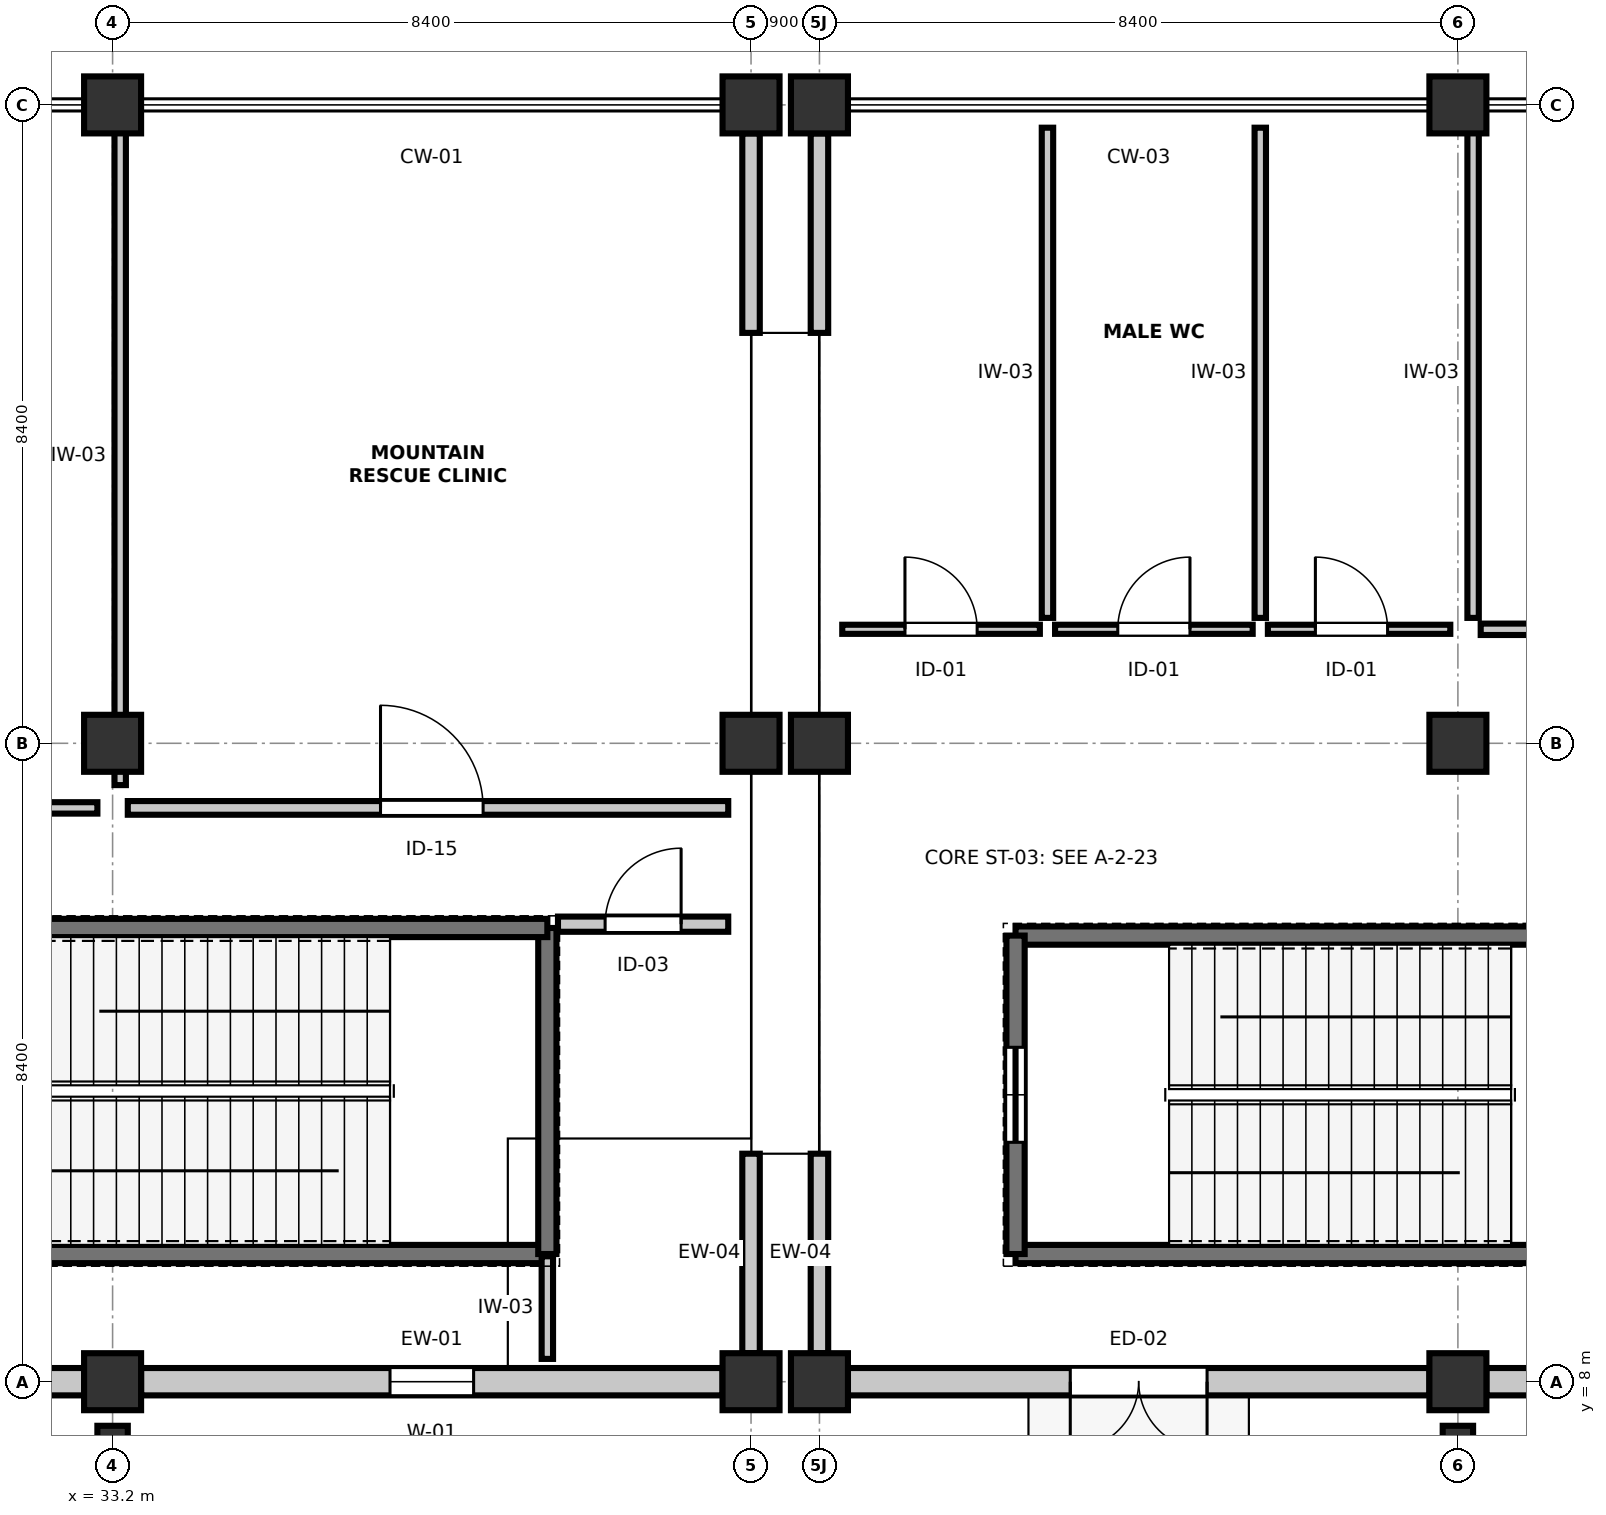
"""IFC4 building model, lengths in metres.
Left out: names, types, materials, properties, quantities, classifications, styles, units other than length and angle.
Written with IfcOpenShell. Run it as: python <this file> out.ifc"""

import sys

from ifc_helpers import new_model, si_unit, direction, frame, frame_2d, origin, origin_2d, place, context, subcontext, project, spatial, rectangle, extrude, element, fill, save


model = new_model("IFC4")
c1 = context("Model", 3, precision=1e-05, world=origin(), true_north=direction((0.0, 1.0)))
c2 = subcontext(c1, "Body", "Model", "MODEL_VIEW")
j1 = project(units=[si_unit("LENGTHUNIT", "METRE"), si_unit("PLANEANGLEUNIT", "RADIAN")], contexts=[c1])
p1 = place(None, origin())
s1 = spatial("IfcSite", under=j1, at=p1, CompositionType="ELEMENT")
p2 = place(p1, origin())
s2 = spatial("IfcBuilding", under=s1, at=p2, CompositionType="ELEMENT")
p3 = place(p2, origin())
s3 = spatial("IfcBuildingStorey", under=s2, at=p3, CompositionType="ELEMENT", Elevation=0.0)
p4 = place(p3, frame((33.2, 8.0, 0.0), z_axis=(0.0, 0.0, 1.0), x_axis=(1.0, 0.0, 0.0)))
e1 = element("IfcColumn", 1, at=p4, inside=s3, PredefinedType="COLUMN", context=c2, shape_type="SweptSolid", body=[
    extrude(rectangle(XDim=0.75, YDim=0.75, at=origin_2d()), origin(), (0.0, 0.0, 1.0), 4.8),
])
p5 = place(p3, frame((33.2, 7.095, 0.0), z_axis=(0.0, 0.0, 1.0), x_axis=(1.0, 0.0, 0.0)))
e2 = element("IfcColumn", 2, at=p5, inside=s3, PredefinedType="PILASTER", context=c2, shape_type="SweptSolid", body=[
    extrude(rectangle(XDim=0.4, YDim=0.65, at=origin_2d()), origin(), (0.0, 0.0, 1.0), 4.8),
])
for number, where, z_axis, x_axis in (
    (3, (33.2, 16.4, 0.0), (0.0, 0.0, 1.0), (1.0, 0.0, 0.0)),
    (4, (33.2, 24.8, 0.0), (0.0, 0.0, 1.0), (1.0, 0.0, 0.0)),
    (5, (41.6, 8.0, 0.0), (0.0, 0.0, 1.0), (1.0, 0.0, 0.0)),
    (6, (41.6, 16.4, 0.0), (0.0, 0.0, 1.0), (1.0, 0.0, 0.0)),
    (7, (41.6, 24.8, 0.0), (0.0, 0.0, 1.0), (1.0, 0.0, 0.0)),
    (8, (42.5, 8.0, 0.0), (0.0, 0.0, 1.0), (1.0, 0.0, 0.0)),
    (9, (42.5, 16.4, 0.0), (0.0, 0.0, 1.0), (1.0, 0.0, 0.0)),
    (10, (42.5, 24.8, 0.0), (0.0, 0.0, 1.0), (1.0, 0.0, 0.0)),
    (11, (50.9, 8.0, 0.0), (0.0, 0.0, 1.0), (1.0, 0.0, 0.0)),
):
    element("IfcColumn", number, at=place(p3, frame(where, z_axis=z_axis, x_axis=x_axis)), inside=s3, PredefinedType="COLUMN", context=c2, shape_type="SweptSolid", body=[
        extrude(rectangle(XDim=0.75, YDim=0.75, at=origin_2d()), origin(), (0.0, 0.0, 1.0), 4.8),
    ])
p6 = place(p3, frame((50.9, 7.095, 0.0), z_axis=(0.0, 0.0, 1.0), x_axis=(1.0, 0.0, 0.0)))
e12 = element("IfcColumn", 12, at=p6, inside=s3, PredefinedType="PILASTER", context=c2, shape_type="SweptSolid", body=[
    extrude(rectangle(XDim=0.4, YDim=0.65, at=origin_2d()), origin(), (0.0, 0.0, 1.0), 4.8),
])
for number, where, z_axis, x_axis in (
    (13, (50.9, 16.4, 0.0), (0.0, 0.0, 1.0), (1.0, 0.0, 0.0)),
    (14, (50.9, 24.8, 0.0), (0.0, 0.0, 1.0), (1.0, 0.0, 0.0)),
):
    element("IfcColumn", number, at=place(p3, frame(where, z_axis=z_axis, x_axis=x_axis)), inside=s3, PredefinedType="COLUMN", context=c2, shape_type="SweptSolid", body=[
        extrude(rectangle(XDim=0.75, YDim=0.75, at=origin_2d()), origin(), (0.0, 0.0, 1.0), 4.8),
    ])
p7 = place(p3, frame((32.825, 8.0, 0.0), z_axis=(0.0, 0.0, 1.0), x_axis=(-1.0, 0.0, 0.0)))
e15 = element("IfcWall", 15, at=p7, inside=s3, PredefinedType="STANDARD", context=c2, shape_type="SweptSolid", body=[
    extrude(rectangle(XDim=7.65, YDim=0.36, at=frame_2d((3.825, 0.0))), origin(), (0.0, 0.0, 1.0), 3.785),
])
p8 = place(p7, frame((2.925, 0.0, 0.0)))
e16 = element("IfcOpeningElement", 16, at=p8, cuts=e15, PredefinedType="OPENING", context=c2, shape_type="SweptSolid", body=[
    extrude(rectangle(XDim=1.8, YDim=2.25, at=frame_2d((0.9, 1.125))), frame((0.0, 0.19, 0.0), z_axis=(0.0, -1.0, 0.0), x_axis=(1.0, 0.0, 0.0)), (0.0, 0.0, 1.0), 0.38),
])
p9 = place(p3, frame((33.575, 8.0, 0.0), z_axis=(0.0, 0.0, 1.0), x_axis=(1.0, 0.0, 0.0)))
e17 = element("IfcWall", 17, at=p9, inside=s3, PredefinedType="STANDARD", context=c2, shape_type="SweptSolid", body=[
    extrude(rectangle(XDim=7.65, YDim=0.36, at=frame_2d((3.825, 0.0))), origin(), (0.0, 0.0, 1.0), 3.785),
])
p10 = place(p9, frame((3.275, 0.0, 0.95)))
e18 = element("IfcOpeningElement", 18, at=p10, cuts=e17, PredefinedType="OPENING", context=c2, shape_type="SweptSolid", body=[
    extrude(rectangle(XDim=1.1, YDim=1.45, at=frame_2d((0.55, 0.725))), frame((0.0, 0.19, 0.0), z_axis=(0.0, -1.0, 0.0), x_axis=(1.0, 0.0, 0.0)), (0.0, 0.0, 1.0), 0.38),
])
p11 = place(p3, frame((41.6, 8.375, 0.0), z_axis=(0.0, 0.0, 1.0), x_axis=(0.0, 1.0, 0.0)))
e19 = element("IfcWall", 19, at=p11, inside=s3, PredefinedType="STANDARD", context=c2, shape_type="SweptSolid", body=[
    extrude(rectangle(XDim=2.625, YDim=0.23, at=frame_2d((1.312, 0.0))), origin(), (0.0, 0.0, 1.0), 3.785),
])
p12 = place(p3, frame((41.6, 21.8, 0.0), z_axis=(0.0, 0.0, 1.0), x_axis=(0.0, 1.0, 0.0)))
e20 = element("IfcWall", 20, at=p12, inside=s3, PredefinedType="STANDARD", context=c2, shape_type="SweptSolid", body=[
    extrude(rectangle(XDim=2.625, YDim=0.23, at=frame_2d((1.312, 0.0))), origin(), (0.0, 0.0, 1.0), 3.715),
])
p13 = place(p3, frame((50.525, 8.0, 0.0), z_axis=(0.0, 0.0, 1.0), x_axis=(-1.0, 0.0, 0.0)))
e21 = element("IfcWall", 21, at=p13, inside=s3, PredefinedType="STANDARD", context=c2, shape_type="SweptSolid", body=[
    extrude(rectangle(XDim=7.65, YDim=0.36, at=frame_2d((3.825, 0.0))), origin(), (0.0, 0.0, 1.0), 3.785),
])
p14 = place(p13, frame((2.925, 0.0, 0.0)))
e22 = element("IfcOpeningElement", 22, at=p14, cuts=e21, PredefinedType="OPENING", context=c2, shape_type="SweptSolid", body=[
    extrude(rectangle(XDim=1.8, YDim=2.25, at=frame_2d((0.9, 1.125))), frame((0.0, 0.19, 0.0), z_axis=(0.0, -1.0, 0.0), x_axis=(1.0, 0.0, 0.0)), (0.0, 0.0, 1.0), 0.38),
])
p15 = place(p3, frame((58.925, 8.0, 0.0), z_axis=(0.0, 0.0, 1.0), x_axis=(-1.0, 0.0, 0.0)))
e23 = element("IfcWall", 23, at=p15, inside=s3, PredefinedType="STANDARD", context=c2, shape_type="SweptSolid", body=[
    extrude(rectangle(XDim=7.65, YDim=0.36, at=frame_2d((3.825, 0.0))), origin(), (0.0, 0.0, 1.0), 3.785),
])
p16 = place(p15, frame((2.925, 0.0, 0.0)))
e24 = element("IfcOpeningElement", 24, at=p16, cuts=e23, PredefinedType="OPENING", context=c2, shape_type="SweptSolid", body=[
    extrude(rectangle(XDim=1.8, YDim=2.25, at=frame_2d((0.9, 1.125))), frame((0.0, 0.19, 0.0), z_axis=(0.0, -1.0, 0.0), x_axis=(1.0, 0.0, 0.0)), (0.0, 0.0, 1.0), 0.38),
])
for number, where, z_axis, x_axis in (
    (25, (42.5, 8.375, 0.0), (0.0, 0.0, 1.0), (0.0, 1.0, 0.0)),
    (26, (42.5, 21.8, 0.0), (0.0, 0.0, 1.0), (0.0, 1.0, 0.0)),
):
    element("IfcWall", number, at=place(p3, frame(where, z_axis=z_axis, x_axis=x_axis)), inside=s3, PredefinedType="STANDARD", context=c2, shape_type="SweptSolid", body=[
        extrude(rectangle(XDim=2.625, YDim=0.23, at=frame_2d((1.312, 0.0))), origin(), (0.0, 0.0, 1.0), 3.785),
    ])
p17 = place(p3, frame((30.28, 9.68, 0.0), z_axis=(0.0, 0.0, 1.0), x_axis=(1.0, 0.0, 0.0)))
e27 = element("IfcWall", 27, at=p17, inside=s3, PredefinedType="SHEAR", context=c2, shape_type="SweptSolid", body=[
    extrude(rectangle(XDim=8.64, YDim=0.24, at=frame_2d((4.32, 0.0))), origin(), (0.0, 0.0, 1.0), 4.55),
])
p18 = place(p3, frame((38.92, 9.68, 0.0), z_axis=(0.0, 0.0, 1.0), x_axis=(0.0, 1.0, 0.0)))
e28 = element("IfcWall", 28, at=p18, inside=s3, PredefinedType="SHEAR", context=c2, shape_type="SweptSolid", body=[
    extrude(rectangle(XDim=4.29, YDim=0.24, at=frame_2d((2.145, 0.0))), origin(), (0.0, 0.0, 1.0), 4.55),
])
p19 = place(p3, frame((38.92, 13.97, 0.0), z_axis=(0.0, 0.0, 1.0), x_axis=(-1.0, 0.0, 0.0)))
e29 = element("IfcWall", 29, at=p19, inside=s3, PredefinedType="SHEAR", context=c2, shape_type="SweptSolid", body=[
    extrude(rectangle(XDim=8.64, YDim=0.24, at=frame_2d((4.32, 0.0))), origin(), (0.0, 0.0, 1.0), 4.55),
])
for number, where, z_axis, x_axis in (
    (30, (45.08, 9.68, 0.0), (0.0, 0.0, 1.0), (1.0, 0.0, 0.0)),
    (31, (53.62, 13.87, 0.0), (0.0, 0.0, 1.0), (-1.0, 0.0, 0.0)),
):
    element("IfcWall", number, at=place(p3, frame(where, z_axis=z_axis, x_axis=x_axis)), inside=s3, PredefinedType="SHEAR", context=c2, shape_type="SweptSolid", body=[
        extrude(rectangle(XDim=8.54, YDim=0.24, at=frame_2d((4.27, 0.0))), origin(), (0.0, 0.0, 1.0), 4.55),
    ])
p20 = place(p3, frame((45.08, 13.87, 0.0), z_axis=(0.0, 0.0, 1.0), x_axis=(0.0, -1.0, 0.0)))
e32 = element("IfcWall", 32, at=p20, inside=s3, PredefinedType="SHEAR", context=c2, shape_type="SweptSolid", body=[
    extrude(rectangle(XDim=4.19, YDim=0.24, at=frame_2d((2.095, 0.0))), origin(), (0.0, 0.0, 1.0), 4.55),
])
p21 = place(p20, frame((1.47, 0.0, 0.0)))
e33 = element("IfcOpeningElement", 33, at=p21, cuts=e32, PredefinedType="OPENING", context=c2, shape_type="SweptSolid", body=[
    extrude(rectangle(XDim=1.25, YDim=2.2, at=frame_2d((0.625, 1.1))), frame((0.0, 0.13, 0.0), z_axis=(0.0, -1.0, 0.0), x_axis=(1.0, 0.0, 0.0)), (0.0, 0.0, 1.0), 0.26),
])
p22 = place(p3, frame((24.6, 15.55, 0.0), z_axis=(0.0, 0.0, 1.0), x_axis=(1.0, 0.0, 0.0)))
e34 = element("IfcWall", 34, at=p22, inside=s3, PredefinedType="PARTITIONING", context=c2, shape_type="SweptSolid", body=[
    extrude(rectangle(XDim=8.4, YDim=0.15, at=frame_2d((4.2, 0.0))), origin(), (0.0, 0.0, 1.0), 4.535),
])
p23 = place(p22, frame((3.65, 0.0, 0.0)))
e35 = element("IfcOpeningElement", 35, at=p23, cuts=e34, PredefinedType="OPENING", context=c2, shape_type="SweptSolid", body=[
    extrude(rectangle(XDim=1.5, YDim=2.24, at=frame_2d((0.75, 1.12))), frame((0.0, 0.085, 0.0), z_axis=(0.0, -1.0, 0.0), x_axis=(1.0, 0.0, 0.0)), (0.0, 0.0, 1.0), 0.17),
])
p24 = place(p3, frame((33.4, 15.55, 0.0), z_axis=(0.0, 0.0, 1.0), x_axis=(1.0, 0.0, 0.0)))
e36 = element("IfcWall", 36, at=p24, inside=s3, PredefinedType="PARTITIONING", context=c2, shape_type="SweptSolid", body=[
    extrude(rectangle(XDim=7.9, YDim=0.18, at=frame_2d((3.95, 0.0))), origin(), (0.0, 0.0, 1.0), 3.785),
])
p25 = place(p24, frame((3.325, 0.0, 0.0)))
e37 = element("IfcOpeningElement", 37, at=p25, cuts=e36, PredefinedType="OPENING", context=c2, shape_type="SweptSolid", body=[
    extrude(rectangle(XDim=1.35, YDim=2.2, at=frame_2d((0.675, 1.1))), frame((0.0, 0.1, 0.0), z_axis=(0.0, -1.0, 0.0), x_axis=(1.0, 0.0, 0.0)), (0.0, 0.0, 1.0), 0.2),
])
p26 = place(p3, frame((33.3, 15.85, 0.0), z_axis=(0.0, 0.0, 1.0), x_axis=(0.0, 1.0, 0.0)))
e38 = element("IfcWall", 38, at=p26, inside=s3, PredefinedType="PARTITIONING", context=c2, shape_type="SweptSolid", body=[
    extrude(rectangle(XDim=8.65, YDim=0.15, at=frame_2d((4.325, 0.0))), origin(), (0.0, 0.0, 1.0), 3.715),
])
p27 = place(p3, frame((39.06, 14.02, 0.0), z_axis=(0.0, 0.0, 1.0), x_axis=(1.0, 0.0, 0.0)))
e39 = element("IfcWall", 39, at=p27, inside=s3, PredefinedType="PARTITIONING", context=c2, shape_type="SweptSolid", body=[
    extrude(rectangle(XDim=2.24, YDim=0.2, at=frame_2d((1.12, 0.0))), origin(), (0.0, 0.0, 1.0), 3.785),
])
p28 = place(p27, frame((0.62, 0.0, 0.0)))
e40 = element("IfcOpeningElement", 40, at=p28, cuts=e39, PredefinedType="OPENING", context=c2, shape_type="SweptSolid", body=[
    extrude(rectangle(XDim=1.0, YDim=2.15, at=frame_2d((0.5, 1.075))), frame((0.0, 0.11, 0.0), z_axis=(0.0, -1.0, 0.0), x_axis=(1.0, 0.0, 0.0)), (0.0, 0.0, 1.0), 0.22),
])
p29 = place(p3, frame((38.92, 8.3, 0.0), z_axis=(0.0, 0.0, 1.0), x_axis=(0.0, 1.0, 0.0)))
e41 = element("IfcWall", 41, at=p29, inside=s3, PredefinedType="PARTITIONING", context=c2, shape_type="SweptSolid", body=[
    extrude(rectangle(XDim=1.35, YDim=0.15, at=frame_2d((0.675, 0.0))), origin(), (0.0, 0.0, 1.0), 4.535),
])
p30 = place(p3, frame((42.8, 17.9, 0.0), z_axis=(0.0, 0.0, 1.0), x_axis=(1.0, 0.0, 0.0)))
e42 = element("IfcWall", 42, at=p30, inside=s3, PredefinedType="PARTITIONING", context=c2, shape_type="SweptSolid", body=[
    extrude(rectangle(XDim=2.6, YDim=0.12, at=frame_2d((1.3, 0.0))), origin(), (0.0, 0.0, 1.0), 4.535),
])
p31 = place(p30, frame((0.825, 0.0, 0.0)))
e43 = element("IfcOpeningElement", 43, at=p31, cuts=e42, PredefinedType="OPENING", context=c2, shape_type="SweptSolid", body=[
    extrude(rectangle(XDim=0.95, YDim=2.12, at=frame_2d((0.475, 1.06))), frame((0.0, 0.07, 0.0), z_axis=(0.0, -1.0, 0.0), x_axis=(1.0, 0.0, 0.0)), (0.0, 0.0, 1.0), 0.14),
])
p32 = place(p3, frame((45.6, 17.9, 0.0), z_axis=(0.0, 0.0, 1.0), x_axis=(1.0, 0.0, 0.0)))
e44 = element("IfcWall", 44, at=p32, inside=s3, PredefinedType="PARTITIONING", context=c2, shape_type="SweptSolid", body=[
    extrude(rectangle(XDim=2.6, YDim=0.12, at=frame_2d((1.3, 0.0))), origin(), (0.0, 0.0, 1.0), 4.535),
])
p33 = place(p32, frame((0.825, 0.0, 0.0)))
e45 = element("IfcOpeningElement", 45, at=p33, cuts=e44, PredefinedType="OPENING", context=c2, shape_type="SweptSolid", body=[
    extrude(rectangle(XDim=0.95, YDim=2.12, at=frame_2d((0.475, 1.06))), frame((0.0, 0.07, 0.0), z_axis=(0.0, -1.0, 0.0), x_axis=(1.0, 0.0, 0.0)), (0.0, 0.0, 1.0), 0.14),
])
p34 = place(p3, frame((45.5, 18.05, 0.0), z_axis=(0.0, 0.0, 1.0), x_axis=(0.0, 1.0, 0.0)))
e46 = element("IfcWall", 46, at=p34, inside=s3, PredefinedType="PARTITIONING", context=c2, shape_type="SweptSolid", body=[
    extrude(rectangle(XDim=6.45, YDim=0.15, at=frame_2d((3.225, 0.0))), origin(), (0.0, 0.0, 1.0), 4.135),
])
p35 = place(p3, frame((48.4, 17.9, 0.0), z_axis=(0.0, 0.0, 1.0), x_axis=(1.0, 0.0, 0.0)))
e47 = element("IfcWall", 47, at=p35, inside=s3, PredefinedType="PARTITIONING", context=c2, shape_type="SweptSolid", body=[
    extrude(rectangle(XDim=2.4, YDim=0.12, at=frame_2d((1.2, 0.0))), origin(), (0.0, 0.0, 1.0), 3.785),
])
p36 = place(p35, frame((0.625, 0.0, 0.0)))
e48 = element("IfcOpeningElement", 48, at=p36, cuts=e47, PredefinedType="OPENING", context=c2, shape_type="SweptSolid", body=[
    extrude(rectangle(XDim=0.95, YDim=2.12, at=frame_2d((0.475, 1.06))), frame((0.0, 0.07, 0.0), z_axis=(0.0, -1.0, 0.0), x_axis=(1.0, 0.0, 0.0)), (0.0, 0.0, 1.0), 0.14),
])
p37 = place(p3, frame((48.3, 18.05, 0.0), z_axis=(0.0, 0.0, 1.0), x_axis=(0.0, 1.0, 0.0)))
e49 = element("IfcWall", 49, at=p37, inside=s3, PredefinedType="PARTITIONING", context=c2, shape_type="SweptSolid", body=[
    extrude(rectangle(XDim=6.45, YDim=0.15, at=frame_2d((3.225, 0.0))), origin(), (0.0, 0.0, 1.0), 4.135),
])
p38 = place(p3, frame((51.2, 17.9, 0.0), z_axis=(0.0, 0.0, 1.0), x_axis=(1.0, 0.0, 0.0)))
e50 = element("IfcWall", 50, at=p38, inside=s3, PredefinedType="PARTITIONING", context=c2, shape_type="SweptSolid", body=[
    extrude(rectangle(XDim=4.0, YDim=0.15, at=frame_2d((2.0, 0.0))), origin(), (0.0, 0.0, 1.0), 4.535),
])
p39 = place(p38, frame((1.5, 0.0, 0.0)))
e51 = element("IfcOpeningElement", 51, at=p39, cuts=e50, PredefinedType="OPENING", context=c2, shape_type="SweptSolid", body=[
    extrude(rectangle(XDim=1.0, YDim=2.14, at=frame_2d((0.5, 1.07))), frame((0.0, 0.085, 0.0), z_axis=(0.0, -1.0, 0.0), x_axis=(1.0, 0.0, 0.0)), (0.0, 0.0, 1.0), 0.17),
])
p40 = place(p3, frame((51.1, 18.05, 0.0), z_axis=(0.0, 0.0, 1.0), x_axis=(0.0, 1.0, 0.0)))
e52 = element("IfcWall", 52, at=p40, inside=s3, PredefinedType="PARTITIONING", context=c2, shape_type="SweptSolid", body=[
    extrude(rectangle(XDim=6.45, YDim=0.15, at=frame_2d((3.225, 0.0))), origin(), (0.0, 0.0, 1.0), 3.785),
])
p41 = place(p10, origin())
e53 = element("IfcWindow", 53, at=p41, inside=s3, PartitioningType="SINGLE_PANEL", PredefinedType="WINDOW", context=c2, shape_type="SweptSolid", body=[
    extrude(rectangle(XDim=1.1, YDim=1.45, at=frame_2d((0.55, 0.725))), frame((0.0, 0.03, 0.0), z_axis=(0.0, -1.0, 0.0), x_axis=(1.0, 0.0, 0.0)), (0.0, 0.0, 1.0), 0.06),
])
fill(e18, e53)
p42 = place(p14, origin())
e54 = element("IfcDoor", 54, at=p42, inside=s3, OperationType="DOUBLE_DOOR_SINGLE_SWING", PredefinedType="DOOR", context=c2, shape_type="SweptSolid", body=[
    extrude(rectangle(XDim=1.8, YDim=2.25, at=frame_2d((0.9, 1.125))), frame((0.0, 0.025, 0.0), z_axis=(0.0, -1.0, 0.0), x_axis=(1.0, 0.0, 0.0)), (0.0, 0.0, 1.0), 0.05),
])
fill(e22, e54)
p43 = place(p21, origin())
e55 = element("IfcDoor", 55, at=p43, inside=s3, OperationType="SINGLE_SWING_RIGHT", PredefinedType="DOOR", context=c2, shape_type="SweptSolid", body=[
    extrude(rectangle(XDim=1.25, YDim=2.2, at=frame_2d((0.625, 1.1))), frame((0.0, 0.025, 0.0), z_axis=(0.0, -1.0, 0.0), x_axis=(1.0, 0.0, 0.0)), (0.0, 0.0, 1.0), 0.05),
])
fill(e33, e55)
p44 = place(p25, origin())
e56 = element("IfcDoor", 56, at=p44, inside=s3, OperationType="SINGLE_SWING_LEFT", PredefinedType="DOOR", context=c2, shape_type="SweptSolid", body=[
    extrude(rectangle(XDim=1.35, YDim=2.2, at=frame_2d((0.675, 1.1))), frame((0.0, 0.025, 0.0), z_axis=(0.0, -1.0, 0.0), x_axis=(1.0, 0.0, 0.0)), (0.0, 0.0, 1.0), 0.05),
])
fill(e37, e56)
p45 = place(p28, origin())
e57 = element("IfcDoor", 57, at=p45, inside=s3, OperationType="SINGLE_SWING_RIGHT", PredefinedType="DOOR", context=c2, shape_type="SweptSolid", body=[
    extrude(rectangle(XDim=1.0, YDim=2.15, at=frame_2d((0.5, 1.075))), frame((0.0, 0.025, 0.0), z_axis=(0.0, -1.0, 0.0), x_axis=(1.0, 0.0, 0.0)), (0.0, 0.0, 1.0), 0.05),
])
fill(e40, e57)
p46 = place(p31, origin())
e58 = element("IfcDoor", 58, at=p46, inside=s3, OperationType="SINGLE_SWING_LEFT", PredefinedType="DOOR", context=c2, shape_type="SweptSolid", body=[
    extrude(rectangle(XDim=0.95, YDim=2.12, at=frame_2d((0.475, 1.06))), frame((0.0, 0.025, 0.0), z_axis=(0.0, -1.0, 0.0), x_axis=(1.0, 0.0, 0.0)), (0.0, 0.0, 1.0), 0.05),
])
fill(e43, e58)
p47 = place(p33, origin())
e59 = element("IfcDoor", 59, at=p47, inside=s3, OperationType="SINGLE_SWING_RIGHT", PredefinedType="DOOR", context=c2, shape_type="SweptSolid", body=[
    extrude(rectangle(XDim=0.95, YDim=2.12, at=frame_2d((0.475, 1.06))), frame((0.0, 0.025, 0.0), z_axis=(0.0, -1.0, 0.0), x_axis=(1.0, 0.0, 0.0)), (0.0, 0.0, 1.0), 0.05),
])
fill(e45, e59)
p48 = place(p36, origin())
e60 = element("IfcDoor", 60, at=p48, inside=s3, OperationType="SINGLE_SWING_LEFT", PredefinedType="DOOR", context=c2, shape_type="SweptSolid", body=[
    extrude(rectangle(XDim=0.95, YDim=2.12, at=frame_2d((0.475, 1.06))), frame((0.0, 0.025, 0.0), z_axis=(0.0, -1.0, 0.0), x_axis=(1.0, 0.0, 0.0)), (0.0, 0.0, 1.0), 0.05),
])
fill(e48, e60)
save(model, sys.argv[1])
